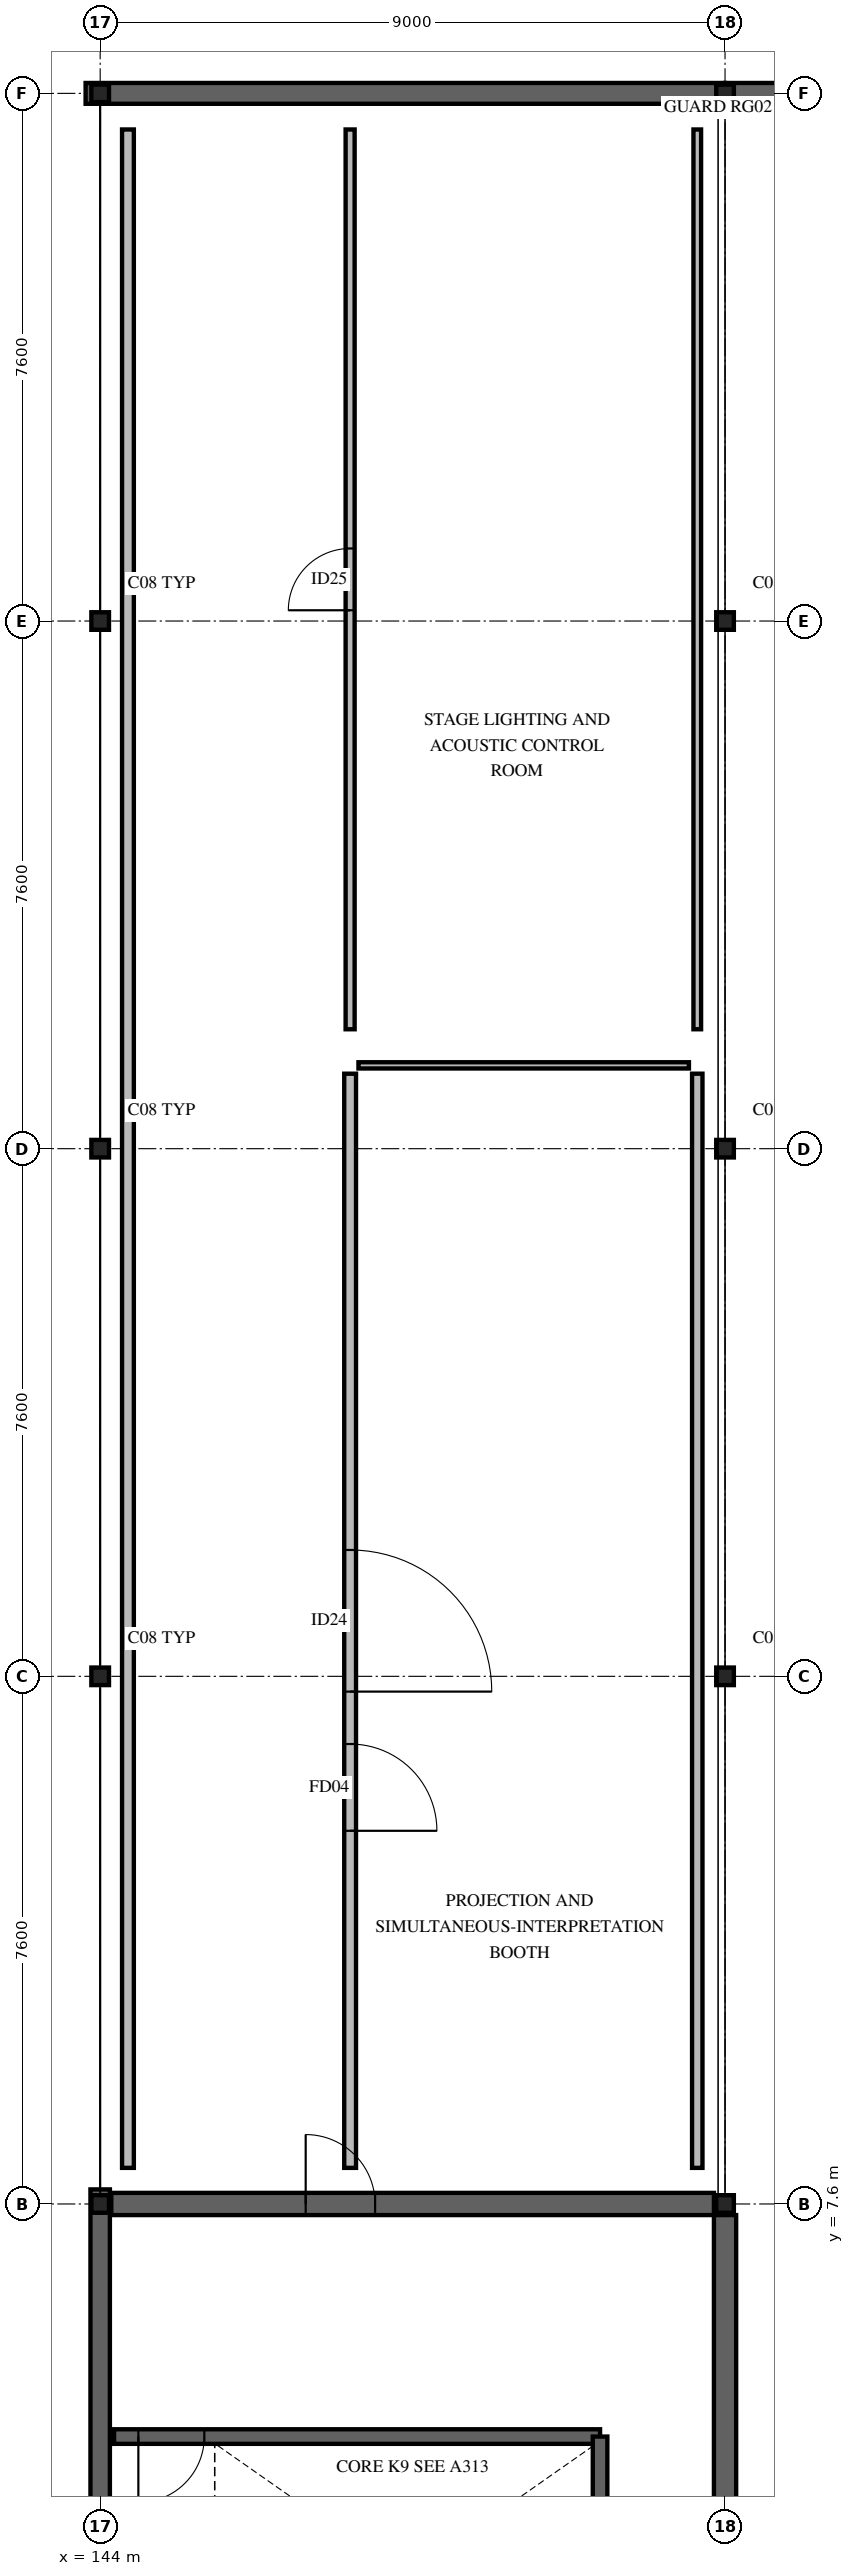
"""IFC4 building model, lengths in metres.
Left out: names, types, materials, properties, quantities, classifications, styles, units other than length and angle.
Written with IfcOpenShell. Run it as: python <this file> out.ifc"""

import sys

from ifc_helpers import new_model, si_unit, direction, frame, frame_2d, origin, origin_2d, place, context, subcontext, project, spatial, rectangle, i_section, extrude, element, fill, save


model = new_model("IFC4")
c1 = context("Model", 3, precision=1e-05, world=origin(), true_north=direction((0.0, 1.0)))
c2 = subcontext(c1, "Body", "Model", "MODEL_VIEW")
j1 = project(units=[si_unit("LENGTHUNIT", "METRE"), si_unit("PLANEANGLEUNIT", "RADIAN")], contexts=[c1])
p1 = place(None, origin())
s1 = spatial("IfcSite", under=j1, at=p1, CompositionType="ELEMENT")
p2 = place(p1, origin())
s2 = spatial("IfcBuilding", under=s1, at=p2, CompositionType="ELEMENT")
p3 = place(p2, frame((0.0, 0.0, 9.36)))
s3 = spatial("IfcBuildingStorey", under=s2, at=p3, CompositionType="ELEMENT", Elevation=9.36)
for number, where, z_axis, x_axis in (
    (1, (144.0, 7.6, 0.0), (0.0, 0.0, 1.0), (1.0, 0.0, 0.0)),
    (2, (144.0, 15.2, 0.0), (0.0, 0.0, 1.0), (1.0, 0.0, 0.0)),
    (3, (144.0, 22.8, 0.0), (0.0, 0.0, 1.0), (1.0, 0.0, 0.0)),
    (4, (144.0, 30.4, 0.0), (0.0, 0.0, 1.0), (1.0, 0.0, 0.0)),
    (5, (144.0, 38.0, 0.0), (0.0, 0.0, 1.0), (1.0, 0.0, 0.0)),
    (6, (153.0, 7.6, 0.0), (0.0, 0.0, 1.0), (1.0, 0.0, 0.0)),
    (7, (153.0, 15.2, 0.0), (0.0, 0.0, 1.0), (1.0, 0.0, 0.0)),
    (8, (153.0, 22.8, 0.0), (0.0, 0.0, 1.0), (1.0, 0.0, 0.0)),
    (9, (153.0, 30.4, 0.0), (0.0, 0.0, 1.0), (1.0, 0.0, 0.0)),
    (10, (153.0, 38.0, 0.0), (0.0, 0.0, 1.0), (1.0, 0.0, 0.0)),
):
    element("IfcColumn", number, at=place(p3, frame(where, z_axis=z_axis, x_axis=x_axis)), inside=s3, PredefinedType="COLUMN", context=c2, shape_type="SweptSolid", body=[
        extrude(i_section(OverallWidth=0.254, OverallDepth=0.253, WebThickness=0.009, FlangeThickness=0.014, FilletRadius=0.012, at=origin_2d()), origin(), (0.0, 0.0, 1.0), 4.32),
    ])
p4 = place(p3, frame((144.0, 0.0, 0.0), z_axis=(0.0, 0.0, 1.0), x_axis=(0.0, 1.0, 0.0)))
e11 = element("IfcWall", 11, at=p4, inside=s3, PredefinedType="SOLIDWALL", context=c2, shape_type="SweptSolid", body=[
    extrude(rectangle(XDim=7.81, YDim=0.28, at=frame_2d((3.905, 0.0))), origin(), (0.0, 0.0, 1.0), 4.14),
])
p5 = place(p3, frame((143.79, 38.0, 0.0), z_axis=(0.0, 0.0, 1.0), x_axis=(1.0, 0.0, 0.0)))
e12 = element("IfcWall", 12, at=p5, inside=s3, PredefinedType="SOLIDWALL", context=c2, shape_type="SweptSolid", body=[
    extrude(rectangle(XDim=9.21, YDim=0.3, at=frame_2d((4.605, 0.0))), origin(), (0.0, 0.0, 1.0), 4.14),
])
p6 = place(p3, frame((153.0, 38.0, 0.0), z_axis=(0.0, 0.0, 1.0), x_axis=(1.0, 0.0, 0.0)))
e13 = element("IfcWall", 13, at=p6, inside=s3, PredefinedType="SOLIDWALL", context=c2, shape_type="SweptSolid", body=[
    extrude(rectangle(XDim=9.0, YDim=0.3, at=frame_2d((4.5, 0.0))), origin(), (0.0, 0.0, 1.0), 4.14),
])
p7 = place(p3, frame((144.16, 7.6, 0.0), z_axis=(0.0, 0.0, 1.0), x_axis=(1.0, 0.0, 0.0)))
e14 = element("IfcWall", 14, at=p7, inside=s3, PredefinedType="SHEAR", context=c2, shape_type="SweptSolid", body=[
    extrude(rectangle(XDim=8.68, YDim=0.32, at=frame_2d((4.34, 0.0))), origin(), (0.0, 0.0, 1.0), 4.04),
])
p8 = place(p7, frame((2.8, 0.0, 0.0)))
e15 = element("IfcOpeningElement", 15, at=p8, cuts=e14, PredefinedType="OPENING", context=c2, shape_type="SweptSolid", body=[
    extrude(rectangle(XDim=1.0, YDim=2.15, at=frame_2d((0.5, 1.075))), frame((0.0, 0.17, 0.0), z_axis=(0.0, -1.0, 0.0), x_axis=(1.0, 0.0, 0.0)), (0.0, 0.0, 1.0), 0.34),
])
p9 = place(p3, frame((153.0, 0.16, 0.0), z_axis=(0.0, 0.0, 1.0), x_axis=(0.0, 1.0, 0.0)))
e16 = element("IfcWall", 16, at=p9, inside=s3, PredefinedType="SHEAR", context=c2, shape_type="SweptSolid", body=[
    extrude(rectangle(XDim=7.28, YDim=0.32, at=frame_2d((3.64, 0.0))), origin(), (0.0, 0.0, 1.0), 4.04),
])
p10 = place(p3, frame((144.2, 4.25, 0.0), z_axis=(0.0, 0.0, 1.0), x_axis=(1.0, 0.0, 0.0)))
e17 = element("IfcWall", 17, at=p10, inside=s3, PredefinedType="SOLIDWALL", context=c2, shape_type="SweptSolid", body=[
    extrude(rectangle(XDim=7.0, YDim=0.21, at=frame_2d((3.5, 0.0))), origin(), (0.0, 0.0, 1.0), 4.04),
])
p11 = place(p10, frame((0.35, 0.0, 0.0)))
e18 = element("IfcOpeningElement", 18, at=p11, cuts=e17, PredefinedType="OPENING", context=c2, shape_type="SweptSolid", body=[
    extrude(rectangle(XDim=0.95, YDim=2.12, at=frame_2d((0.475, 1.06))), frame((0.0, 0.115, 0.0), z_axis=(0.0, -1.0, 0.0), x_axis=(1.0, 0.0, 0.0)), (0.0, 0.0, 1.0), 0.23),
])
p12 = place(p3, frame((151.2, 0.2, 0.0), z_axis=(0.0, 0.0, 1.0), x_axis=(0.0, 1.0, 0.0)))
e19 = element("IfcWall", 19, at=p12, inside=s3, PredefinedType="SOLIDWALL", context=c2, shape_type="SweptSolid", body=[
    extrude(rectangle(XDim=4.05, YDim=0.21, at=frame_2d((2.025, 0.0))), origin(), (0.0, 0.0, 1.0), 4.04),
])
p13 = place(p3, frame((147.6, 8.12, 0.0), z_axis=(0.0, 0.0, 1.0), x_axis=(0.0, 1.0, 0.0)))
e20 = element("IfcWall", 20, at=p13, inside=s3, PredefinedType="PARTITIONING", context=c2, shape_type="SweptSolid", body=[
    extrude(rectangle(XDim=15.76, YDim=0.17, at=frame_2d((7.88, 0.0))), origin(), (0.0, 0.0, 1.0), 4.04),
])
p14 = place(p13, frame((6.86, 0.0, 0.0)))
e21 = element("IfcOpeningElement", 21, at=p14, cuts=e20, PredefinedType="OPENING", context=c2, shape_type="SweptSolid", body=[
    extrude(rectangle(XDim=2.04, YDim=2.1, at=frame_2d((1.02, 1.05))), frame((0.0, 0.095, 0.0), z_axis=(0.0, -1.0, 0.0), x_axis=(1.0, 0.0, 0.0)), (0.0, 0.0, 1.0), 0.19),
])
p15 = place(p13, frame((4.855, 0.0, 0.0)))
e22 = element("IfcOpeningElement", 22, at=p15, cuts=e20, PredefinedType="OPENING", context=c2, shape_type="SweptSolid", body=[
    extrude(rectangle(XDim=1.25, YDim=2.18, at=frame_2d((0.625, 1.09))), frame((0.0, 0.095, 0.0), z_axis=(0.0, -1.0, 0.0), x_axis=(1.0, 0.0, 0.0)), (0.0, 0.0, 1.0), 0.19),
])
p16 = place(p3, frame((147.72, 24.0, 0.0), z_axis=(0.0, 0.0, 1.0), x_axis=(1.0, 0.0, 0.0)))
e23 = element("IfcWall", 23, at=p16, inside=s3, PredefinedType="PARTITIONING", context=c2, shape_type="SweptSolid", body=[
    extrude(rectangle(XDim=4.76, YDim=0.09, at=frame_2d((2.38, 0.0))), origin(), (0.0, 0.0, 1.0), 4.04),
])
p17 = place(p3, frame((152.6, 8.12, 0.0), z_axis=(0.0, 0.0, 1.0), x_axis=(0.0, 1.0, 0.0)))
e24 = element("IfcWall", 24, at=p17, inside=s3, PredefinedType="PARTITIONING", context=c2, shape_type="SweptSolid", body=[
    extrude(rectangle(XDim=15.76, YDim=0.15, at=frame_2d((7.88, 0.0))), origin(), (0.0, 0.0, 1.0), 4.04),
])
p18 = place(p3, frame((147.6, 24.52, 0.0), z_axis=(0.0, 0.0, 1.0), x_axis=(0.0, 1.0, 0.0)))
e25 = element("IfcWall", 25, at=p18, inside=s3, PredefinedType="PARTITIONING", context=c2, shape_type="SweptSolid", body=[
    extrude(rectangle(XDim=12.96, YDim=0.13, at=frame_2d((6.48, 0.0))), origin(), (0.0, 0.0, 1.0), 4.04),
])
p19 = place(p18, frame((6.035, 0.0, 0.0)))
e26 = element("IfcOpeningElement", 26, at=p19, cuts=e25, PredefinedType="OPENING", context=c2, shape_type="SweptSolid", body=[
    extrude(rectangle(XDim=0.89, YDim=2.15, at=frame_2d((0.445, 1.075))), frame((0.0, 0.075, 0.0), z_axis=(0.0, -1.0, 0.0), x_axis=(1.0, 0.0, 0.0)), (0.0, 0.0, 1.0), 0.15),
])
p20 = place(p3, frame((152.6, 24.52, 0.0), z_axis=(0.0, 0.0, 1.0), x_axis=(0.0, 1.0, 0.0)))
e27 = element("IfcWall", 27, at=p20, inside=s3, PredefinedType="PARTITIONING", context=c2, shape_type="SweptSolid", body=[
    extrude(rectangle(XDim=12.96, YDim=0.11, at=frame_2d((6.48, 0.0))), origin(), (0.0, 0.0, 1.0), 4.04),
])
p21 = place(p3, frame((144.4, 8.12, 0.0), z_axis=(0.0, 0.0, 1.0), x_axis=(0.0, 1.0, 0.0)))
e28 = element("IfcWall", 28, at=p21, inside=s3, PredefinedType="PARTITIONING", context=c2, shape_type="SweptSolid", body=[
    extrude(rectangle(XDim=29.36, YDim=0.17, at=frame_2d((14.68, 0.0))), origin(), (0.0, 0.0, 1.0), 4.04),
])
p22 = place(p11, origin())
e29 = element("IfcDoor", 29, at=p22, inside=s3, OperationType="SINGLE_SWING_RIGHT", PredefinedType="DOOR", context=c2, shape_type="SweptSolid", body=[
    extrude(rectangle(XDim=0.95, YDim=2.12, at=frame_2d((0.475, 1.06))), frame((0.0, 0.025, 0.0), z_axis=(0.0, -1.0, 0.0), x_axis=(1.0, 0.0, 0.0)), (0.0, 0.0, 1.0), 0.05),
])
fill(e18, e29)
p23 = place(p8, origin())
e30 = element("IfcDoor", 30, at=p23, inside=s3, OperationType="SINGLE_SWING_LEFT", PredefinedType="DOOR", context=c2, shape_type="SweptSolid", body=[
    extrude(rectangle(XDim=1.0, YDim=2.15, at=frame_2d((0.5, 1.075))), frame((0.0, 0.025, 0.0), z_axis=(0.0, -1.0, 0.0), x_axis=(1.0, 0.0, 0.0)), (0.0, 0.0, 1.0), 0.05),
])
fill(e15, e30)
p24 = place(p14, origin())
e31 = element("IfcDoor", 31, at=p24, inside=s3, OperationType="SINGLE_SWING_RIGHT", PredefinedType="DOOR", context=c2, shape_type="SweptSolid", body=[
    extrude(rectangle(XDim=2.04, YDim=2.1, at=frame_2d((1.02, 1.05))), frame((0.0, 0.025, 0.0), z_axis=(0.0, -1.0, 0.0), x_axis=(1.0, 0.0, 0.0)), (0.0, 0.0, 1.0), 0.05),
])
fill(e21, e31)
p25 = place(p19, origin())
e32 = element("IfcDoor", 32, at=p25, inside=s3, OperationType="SINGLE_SWING_LEFT", PredefinedType="DOOR", context=c2, shape_type="SweptSolid", body=[
    extrude(rectangle(XDim=0.89, YDim=2.15, at=frame_2d((0.445, 1.075))), frame((0.0, 0.025, 0.0), z_axis=(0.0, -1.0, 0.0), x_axis=(1.0, 0.0, 0.0)), (0.0, 0.0, 1.0), 0.05),
])
fill(e26, e32)
p26 = place(p15, origin())
e33 = element("IfcDoor", 33, at=p26, inside=s3, OperationType="SINGLE_SWING_RIGHT", PredefinedType="DOOR", context=c2, shape_type="SweptSolid", body=[
    extrude(rectangle(XDim=1.25, YDim=2.18, at=frame_2d((0.625, 1.09))), frame((0.0, 0.025, 0.0), z_axis=(0.0, -1.0, 0.0), x_axis=(1.0, 0.0, 0.0)), (0.0, 0.0, 1.0), 0.05),
])
fill(e22, e33)
save(model, sys.argv[1])
